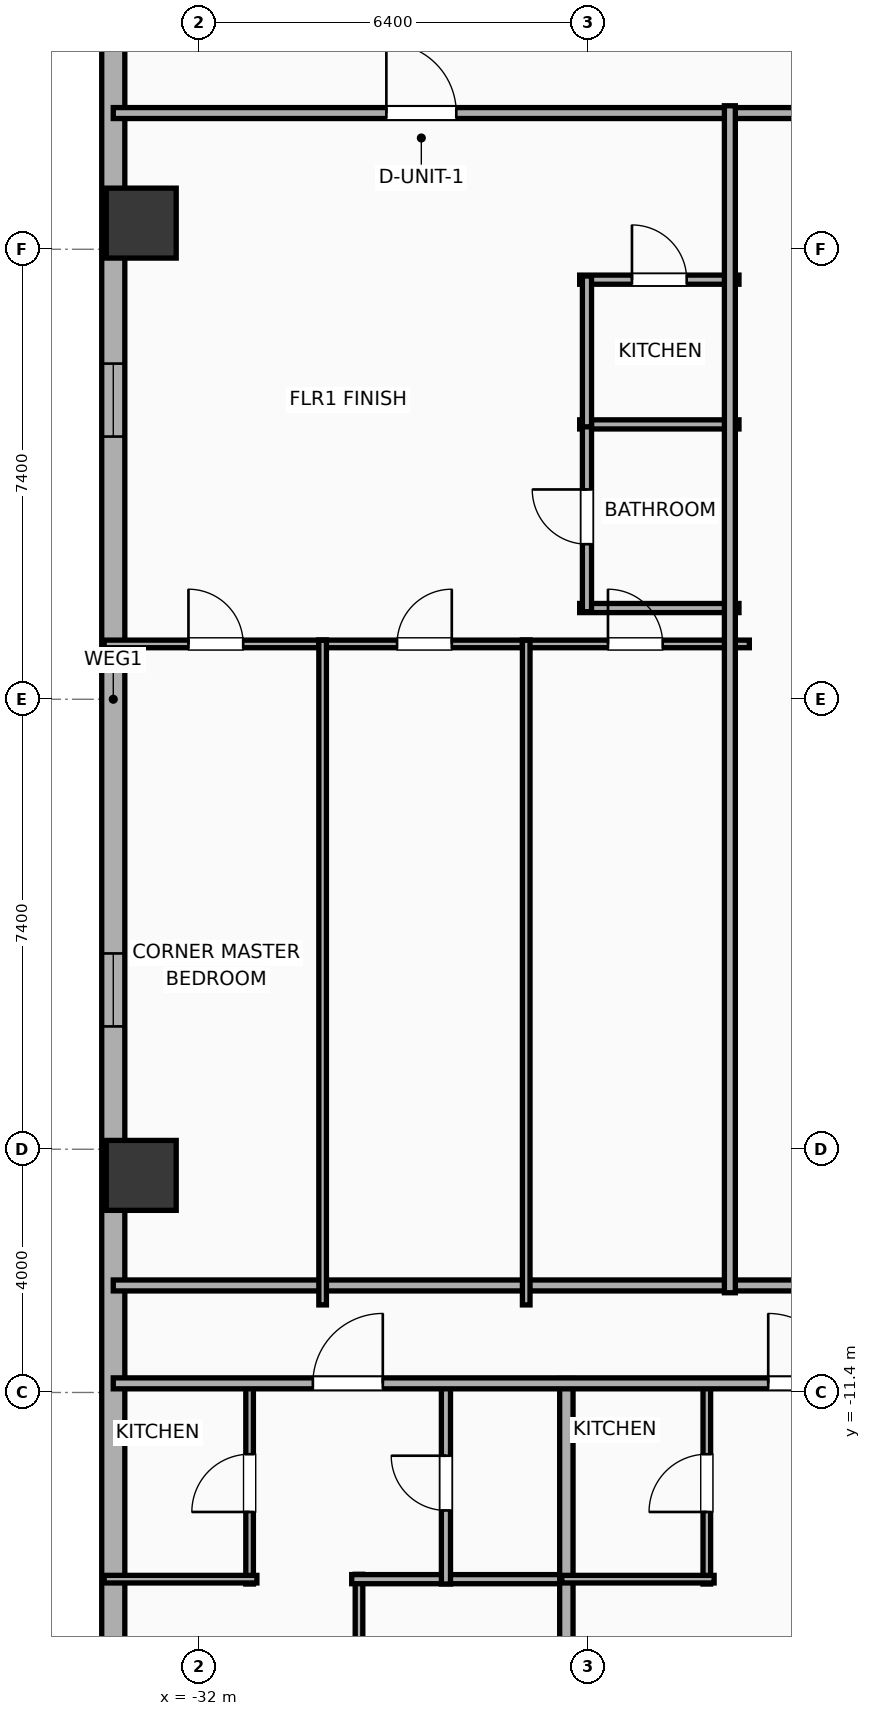
"""IFC4 building model, lengths in metres.
Left out: names, types, materials, properties, quantities, classifications, styles, units other than length and angle.
Written with IfcOpenShell. Run it as: python <this file> out.ifc"""

import sys

from ifc_helpers import new_model, si_unit, direction, frame, frame_2d, origin, origin_2d, place, context, subcontext, project, spatial, rectangle, hollow_rectangle, extrude, element, fill, save


model = new_model("IFC4")
c1 = context("Model", 3, precision=1e-05, world=origin(), true_north=direction((0.0, 1.0)))
c2 = subcontext(c1, "Body", "Model", "MODEL_VIEW")
j1 = project(units=[si_unit("LENGTHUNIT", "METRE"), si_unit("PLANEANGLEUNIT", "RADIAN")], contexts=[c1])
p1 = place(None, origin())
s1 = spatial("IfcSite", under=j1, at=p1, CompositionType="ELEMENT")
p2 = place(p1, origin())
s2 = spatial("IfcBuilding", under=s1, at=p2, CompositionType="ELEMENT")
p3 = place(p2, frame((0.0, 0.0, 76.7)))
s3 = spatial("IfcBuildingStorey", under=s2, at=p3, CompositionType="ELEMENT", Elevation=76.7)
for number, where, z_axis, x_axis in (
    (1, (-32.95, 7.83, 0.0), (0.0, 0.0, 1.0), (1.0, 0.0, 0.0)),
    (2, (-32.95, -7.83, 0.0), (0.0, 0.0, 1.0), (1.0, 0.0, 0.0)),
):
    element("IfcColumn", number, at=place(p3, frame(where, z_axis=z_axis, x_axis=x_axis)), inside=s3, PredefinedType="COLUMN", context=c2, shape_type="SweptSolid", body=[
        extrude(hollow_rectangle(XDim=1.15, YDim=1.15, WallThickness=0.04, at=origin_2d()), origin(), (0.0, 0.0, 1.0), 3.9),
    ])
p4 = place(p3, frame((-33.41, -18.381, 0.0), z_axis=(0.0, 0.0, 1.0), x_axis=(0.0, 1.0, 0.0)))
e3 = element("IfcWall", 3, at=p4, inside=s3, PredefinedType="ELEMENTEDWALL", context=c2, shape_type="SweptSolid", body=[
    extrude(rectangle(XDim=36.763, YDim=0.38, at=frame_2d((18.381, 0.0))), origin(), (0.0, 0.0, 1.0), 3.6),
])
p5 = place(p4, frame((33.762, 0.0, 0.75)))
e4 = element("IfcOpeningElement", 4, at=p5, cuts=e3, PredefinedType="OPENING", context=c2, shape_type="SweptSolid", body=[
    extrude(rectangle(XDim=1.2, YDim=2.05, at=frame_2d((0.6, 1.025))), frame((0.0, 0.2, 0.0), z_axis=(0.0, -1.0, 0.0), x_axis=(1.0, 0.0, 0.0)), (0.0, 0.0, 1.0), 0.4),
])
p6 = place(p4, frame((22.701, 0.0, 0.75)))
e5 = element("IfcOpeningElement", 5, at=p6, cuts=e3, PredefinedType="OPENING", context=c2, shape_type="SweptSolid", body=[
    extrude(rectangle(XDim=1.2, YDim=2.05, at=frame_2d((0.6, 1.025))), frame((0.0, 0.2, 0.0), z_axis=(0.0, -1.0, 0.0), x_axis=(1.0, 0.0, 0.0)), (0.0, 0.0, 1.0), 0.4),
])
p7 = place(p4, frame((13.001, 0.0, 0.75)))
e6 = element("IfcOpeningElement", 6, at=p7, cuts=e3, PredefinedType="OPENING", context=c2, shape_type="SweptSolid", body=[
    extrude(rectangle(XDim=1.2, YDim=2.05, at=frame_2d((0.6, 1.025))), frame((0.0, 0.2, 0.0), z_axis=(0.0, -1.0, 0.0), x_axis=(1.0, 0.0, 0.0)), (0.0, 0.0, 1.0), 0.4),
])
p8 = place(p3, frame((-33.41, 9.64, 0.0), z_axis=(0.0, 0.0, 1.0), x_axis=(1.0, 0.0, 0.0)))
e7 = element("IfcWall", 7, at=p8, inside=s3, PredefinedType="PARTITIONING", context=c2, shape_type="SweptSolid", body=[
    extrude(rectangle(XDim=23.53, YDim=0.18, at=frame_2d((11.765, 0.0))), origin(), (0.0, 0.0, 1.0), 3.6),
])
p9 = place(p8, frame((4.491, 0.0, 0.0)))
e8 = element("IfcOpeningElement", 8, at=p9, cuts=e7, PredefinedType="OPENING", context=c2, shape_type="SweptSolid", body=[
    extrude(rectangle(XDim=1.15, YDim=2.05, at=frame_2d((0.575, 1.025))), frame((0.0, 0.1, 0.0), z_axis=(0.0, -1.0, 0.0), x_axis=(1.0, 0.0, 0.0)), (0.0, 0.0, 1.0), 0.2),
])
p10 = place(p3, frame((-33.41, -9.64, 0.0), z_axis=(0.0, 0.0, 1.0), x_axis=(1.0, 0.0, 0.0)))
e9 = element("IfcWall", 9, at=p10, inside=s3, PredefinedType="PARTITIONING", context=c2, shape_type="SweptSolid", body=[
    extrude(rectangle(XDim=23.53, YDim=0.18, at=frame_2d((11.765, 0.0))), origin(), (0.0, 0.0, 1.0), 3.6),
])
p11 = place(p3, frame((-29.369, -22.36, 0.0), z_axis=(0.0, 0.0, 1.0), x_axis=(0.0, 1.0, 0.0)))
e10 = element("IfcWall", 10, at=p11, inside=s3, PredefinedType="PARTITIONING", context=c2, shape_type="SweptSolid", body=[
    extrude(rectangle(XDim=7.97, YDim=0.125, at=frame_2d((3.985, 0.0))), origin(), (0.0, 0.0, 1.0), 3.6),
])
p12 = place(p11, frame((5.607, 0.0, 0.0)))
e11 = element("IfcOpeningElement", 11, at=p12, cuts=e10, PredefinedType="OPENING", context=c2, shape_type="SweptSolid", body=[
    extrude(rectangle(XDim=0.9, YDim=2.05, at=frame_2d((0.45, 1.025))), frame((0.0, 0.073, 0.0), z_axis=(0.0, -1.0, 0.0), x_axis=(1.0, 0.0, 0.0)), (0.0, 0.0, 1.0), 0.145),
])
p13 = place(p3, frame((-29.489, -14.47, 0.0), z_axis=(0.0, 0.0, 1.0), x_axis=(1.0, 0.0, 0.0)))
e12 = element("IfcWall", 12, at=p13, inside=s3, PredefinedType="PLUMBINGWALL", context=c2, shape_type="SweptSolid", body=[
    extrude(rectangle(XDim=3.605, YDim=0.15, at=frame_2d((1.802, 0.0))), origin(), (0.0, 0.0, 1.0), 3.6),
])
p14 = place(p3, frame((-31.168, -14.55, 0.0), z_axis=(0.0, 0.0, 1.0), x_axis=(0.0, 1.0, 0.0)))
e13 = element("IfcWall", 13, at=p14, inside=s3, PredefinedType="PARTITIONING", context=c2, shape_type="SweptSolid", body=[
    extrude(rectangle(XDim=3.32, YDim=0.125, at=frame_2d((1.66, 0.0))), origin(), (0.0, 0.0, 1.0), 2.89),
])
p15 = place(p14, frame((1.185, 0.0, 0.0)))
e14 = element("IfcOpeningElement", 14, at=p15, cuts=e13, PredefinedType="OPENING", context=c2, shape_type="SweptSolid", body=[
    extrude(rectangle(XDim=0.95, YDim=2.05, at=frame_2d((0.475, 1.025))), frame((0.0, 0.073, 0.0), z_axis=(0.0, -1.0, 0.0), x_axis=(1.0, 0.0, 0.0)), (0.0, 0.0, 1.0), 0.145),
])
p16 = place(p3, frame((-33.56, -14.47, 0.0), z_axis=(0.0, 0.0, 1.0), x_axis=(1.0, 0.0, 0.0)))
e15 = element("IfcWall", 15, at=p16, inside=s3, PredefinedType="PARTITIONING", context=c2, shape_type="SweptSolid", body=[
    extrude(rectangle(XDim=2.512, YDim=0.125, at=frame_2d((1.256, 0.0))), origin(), (0.0, 0.0, 1.0), 3.6),
])
p17 = place(p3, frame((-27.939, -14.55, 0.0), z_axis=(0.0, 0.0, 1.0), x_axis=(0.0, 1.0, 0.0)))
e16 = element("IfcWall", 16, at=p17, inside=s3, PredefinedType="PLUMBINGWALL", context=c2, shape_type="SweptSolid", body=[
    extrude(rectangle(XDim=3.32, YDim=0.15, at=frame_2d((1.66, 0.0))), origin(), (0.0, 0.0, 1.0), 3.6),
])
p18 = place(p17, frame((1.21, 0.0, 0.0)))
e17 = element("IfcOpeningElement", 17, at=p18, cuts=e16, PredefinedType="OPENING", context=c2, shape_type="SweptSolid", body=[
    extrude(rectangle(XDim=0.9, YDim=2.05, at=frame_2d((0.45, 1.025))), frame((0.0, 0.085, 0.0), z_axis=(0.0, -1.0, 0.0), x_axis=(1.0, 0.0, 0.0)), (0.0, 0.0, 1.0), 0.17),
])
p19 = place(p3, frame((-25.959, -22.21, 0.0), z_axis=(0.0, 0.0, 1.0), x_axis=(0.0, 1.0, 0.0)))
e18 = element("IfcWall", 18, at=p19, inside=s3, PredefinedType="PARTITIONING", context=c2, shape_type="SweptSolid", body=[
    extrude(rectangle(XDim=11.04, YDim=0.22, at=frame_2d((5.52, 0.0))), origin(), (0.0, 0.0, 1.0), 3.6),
])
p20 = place(p3, frame((-23.649, -14.55, 0.0), z_axis=(0.0, 0.0, 1.0), x_axis=(0.0, 1.0, 0.0)))
e19 = element("IfcWall", 19, at=p20, inside=s3, PredefinedType="PARTITIONING", context=c2, shape_type="SweptSolid", body=[
    extrude(rectangle(XDim=3.32, YDim=0.125, at=frame_2d((1.66, 0.0))), origin(), (0.0, 0.0, 1.0), 3.6),
])
p21 = place(p20, frame((1.185, 0.0, 0.0)))
e20 = element("IfcOpeningElement", 20, at=p21, cuts=e19, PredefinedType="OPENING", context=c2, shape_type="SweptSolid", body=[
    extrude(rectangle(XDim=0.95, YDim=2.05, at=frame_2d((0.475, 1.025))), frame((0.0, 0.073, 0.0), z_axis=(0.0, -1.0, 0.0), x_axis=(1.0, 0.0, 0.0)), (0.0, 0.0, 1.0), 0.145),
])
p22 = place(p3, frame((-26.034, -14.47, 0.0), z_axis=(0.0, 0.0, 1.0), x_axis=(1.0, 0.0, 0.0)))
e21 = element("IfcWall", 21, at=p22, inside=s3, PredefinedType="PARTITIONING", context=c2, shape_type="SweptSolid", body=[
    extrude(rectangle(XDim=2.505, YDim=0.125, at=frame_2d((1.252, 0.0))), origin(), (0.0, 0.0, 1.0), 3.6),
])
p23 = place(p3, frame((-33.41, -11.25, 0.0), z_axis=(0.0, 0.0, 1.0), x_axis=(1.0, 0.0, 0.0)))
e22 = element("IfcWall", 22, at=p23, inside=s3, PredefinedType="PARTITIONING", context=c2, shape_type="SweptSolid", body=[
    extrude(rectangle(XDim=59.62, YDim=0.18, at=frame_2d((29.81, 0.0))), origin(), (0.0, 0.0, 1.0), 3.6),
])
p24 = place(p23, frame((3.282, 0.0, 0.0)))
e23 = element("IfcOpeningElement", 23, at=p24, cuts=e22, PredefinedType="OPENING", context=c2, shape_type="SweptSolid", body=[
    extrude(rectangle(XDim=1.15, YDim=2.05, at=frame_2d((0.575, 1.025))), frame((0.0, 0.1, 0.0), z_axis=(0.0, -1.0, 0.0), x_axis=(1.0, 0.0, 0.0)), (0.0, 0.0, 1.0), 0.2),
])
p25 = place(p23, frame((10.771, 0.0, 0.0)))
e24 = element("IfcOpeningElement", 24, at=p25, cuts=e22, PredefinedType="OPENING", context=c2, shape_type="SweptSolid", body=[
    extrude(rectangle(XDim=1.15, YDim=2.05, at=frame_2d((0.575, 1.025))), frame((0.0, 0.1, 0.0), z_axis=(0.0, -1.0, 0.0), x_axis=(1.0, 0.0, 0.0)), (0.0, 0.0, 1.0), 0.2),
])
p26 = place(p23, frame((18.778, 0.0, 0.0)))
e25 = element("IfcOpeningElement", 25, at=p26, cuts=e22, PredefinedType="OPENING", context=c2, shape_type="SweptSolid", body=[
    extrude(rectangle(XDim=1.15, YDim=2.05, at=frame_2d((0.575, 1.025))), frame((0.0, 0.1, 0.0), z_axis=(0.0, -1.0, 0.0), x_axis=(1.0, 0.0, 0.0)), (0.0, 0.0, 1.0), 0.2),
])
p27 = place(p23, frame((24.34, 0.0, 0.0)))
e26 = element("IfcOpeningElement", 26, at=p27, cuts=e22, PredefinedType="OPENING", context=c2, shape_type="SweptSolid", body=[
    extrude(rectangle(XDim=0.9, YDim=2.05, at=frame_2d((0.45, 1.025))), frame((0.0, 0.1, 0.0), z_axis=(0.0, -1.0, 0.0), x_axis=(1.0, 0.0, 0.0)), (0.0, 0.0, 1.0), 0.2),
])
p28 = place(p23, frame((31.829, 0.0, 0.0)))
e27 = element("IfcOpeningElement", 27, at=p28, cuts=e22, PredefinedType="OPENING", context=c2, shape_type="SweptSolid", body=[
    extrude(rectangle(XDim=1.15, YDim=2.05, at=frame_2d((0.575, 1.025))), frame((0.0, 0.1, 0.0), z_axis=(0.0, -1.0, 0.0), x_axis=(1.0, 0.0, 0.0)), (0.0, 0.0, 1.0), 0.2),
])
p29 = place(p23, frame((35.948, 0.0, 0.0)))
e28 = element("IfcOpeningElement", 28, at=p29, cuts=e22, PredefinedType="OPENING", context=c2, shape_type="SweptSolid", body=[
    extrude(rectangle(XDim=1.15, YDim=2.05, at=frame_2d((0.575, 1.025))), frame((0.0, 0.1, 0.0), z_axis=(0.0, -1.0, 0.0), x_axis=(1.0, 0.0, 0.0)), (0.0, 0.0, 1.0), 0.2),
])
p30 = place(p23, frame((43.705, 0.0, 0.0)))
e29 = element("IfcOpeningElement", 29, at=p30, cuts=e22, PredefinedType="OPENING", context=c2, shape_type="SweptSolid", body=[
    extrude(rectangle(XDim=0.9, YDim=2.05, at=frame_2d((0.45, 1.025))), frame((0.0, 0.1, 0.0), z_axis=(0.0, -1.0, 0.0), x_axis=(1.0, 0.0, 0.0)), (0.0, 0.0, 1.0), 0.2),
])
p31 = place(p23, frame((48.552, 0.0, 0.0)))
e30 = element("IfcOpeningElement", 30, at=p31, cuts=e22, PredefinedType="OPENING", context=c2, shape_type="SweptSolid", body=[
    extrude(rectangle(XDim=1.15, YDim=2.05, at=frame_2d((0.575, 1.025))), frame((0.0, 0.1, 0.0), z_axis=(0.0, -1.0, 0.0), x_axis=(1.0, 0.0, 0.0)), (0.0, 0.0, 1.0), 0.2),
])
p32 = place(p23, frame((56.213, 0.0, 0.0)))
e31 = element("IfcOpeningElement", 31, at=p32, cuts=e22, PredefinedType="OPENING", context=c2, shape_type="SweptSolid", body=[
    extrude(rectangle(XDim=0.9, YDim=2.05, at=frame_2d((0.45, 1.025))), frame((0.0, 0.1, 0.0), z_axis=(0.0, -1.0, 0.0), x_axis=(1.0, 0.0, 0.0)), (0.0, 0.0, 1.0), 0.2),
])
p33 = place(p3, frame((-25.74, 6.9, 0.0), z_axis=(0.0, 0.0, 1.0), x_axis=(1.0, 0.0, 0.0)))
e32 = element("IfcWall", 32, at=p33, inside=s3, PredefinedType="PLUMBINGWALL", context=c2, shape_type="SweptSolid", body=[
    extrude(rectangle(XDim=2.62, YDim=0.15, at=frame_2d((1.31, 0.0))), origin(), (0.0, 0.0, 1.0), 3.6),
])
p34 = place(p33, frame((0.86, 0.0, 0.0)))
e33 = element("IfcOpeningElement", 33, at=p34, cuts=e32, PredefinedType="OPENING", context=c2, shape_type="SweptSolid", body=[
    extrude(rectangle(XDim=0.9, YDim=2.05, at=frame_2d((0.45, 1.025))), frame((0.0, 0.085, 0.0), z_axis=(0.0, -1.0, 0.0), x_axis=(1.0, 0.0, 0.0)), (0.0, 0.0, 1.0), 0.17),
])
for number, where, z_axis, x_axis in (
    (34, (-25.74, 4.52, 0.0), (0.0, 0.0, 1.0), (1.0, 0.0, 0.0)),
    (35, (-25.74, 1.5, 0.0), (0.0, 0.0, 1.0), (1.0, 0.0, 0.0)),
):
    element("IfcWall", number, at=place(p3, frame(where, z_axis=z_axis, x_axis=x_axis)), inside=s3, PredefinedType="PLUMBINGWALL", context=c2, shape_type="SweptSolid", body=[
        extrude(rectangle(XDim=2.62, YDim=0.15, at=frame_2d((1.31, 0.0))), origin(), (0.0, 0.0, 1.0), 3.6),
    ])
p35 = place(p3, frame((-25.62, 1.44, 0.0), z_axis=(0.0, 0.0, 1.0), x_axis=(0.0, 1.0, 0.0)))
e36 = element("IfcWall", 36, at=p35, inside=s3, PredefinedType="PLUMBINGWALL", context=c2, shape_type="SweptSolid", body=[
    extrude(rectangle(XDim=3.12, YDim=0.15, at=frame_2d((1.56, 0.0))), origin(), (0.0, 0.0, 1.0), 3.6),
])
p36 = place(p35, frame((1.11, 0.0, 0.0)))
e37 = element("IfcOpeningElement", 37, at=p36, cuts=e36, PredefinedType="OPENING", context=c2, shape_type="SweptSolid", body=[
    extrude(rectangle(XDim=0.9, YDim=2.05, at=frame_2d((0.45, 1.025))), frame((0.0, 0.085, 0.0), z_axis=(0.0, -1.0, 0.0), x_axis=(1.0, 0.0, 0.0)), (0.0, 0.0, 1.0), 0.17),
])
p37 = place(p3, frame((-25.62, 4.48, 0.0), z_axis=(0.0, 0.0, 1.0), x_axis=(0.0, 1.0, 0.0)))
e38 = element("IfcWall", 38, at=p37, inside=s3, PredefinedType="PLUMBINGWALL", context=c2, shape_type="SweptSolid", body=[
    extrude(rectangle(XDim=2.48, YDim=0.15, at=frame_2d((1.24, 0.0))), origin(), (0.0, 0.0, 1.0), 3.6),
])
p38 = place(p3, frame((-33.56, 0.91, 0.0), z_axis=(0.0, 0.0, 1.0), x_axis=(1.0, 0.0, 0.0)))
e39 = element("IfcWall", 39, at=p38, inside=s3, PredefinedType="PARTITIONING", context=c2, shape_type="SweptSolid", body=[
    extrude(rectangle(XDim=3.656, YDim=0.125, at=frame_2d((1.828, 0.0))), origin(), (0.0, 0.0, 1.0), 3.6),
])
p39 = place(p38, frame((1.386, 0.0, 0.0)))
e40 = element("IfcOpeningElement", 40, at=p39, cuts=e39, PredefinedType="OPENING", context=c2, shape_type="SweptSolid", body=[
    extrude(rectangle(XDim=0.9, YDim=2.05, at=frame_2d((0.45, 1.025))), frame((0.0, 0.073, 0.0), z_axis=(0.0, -1.0, 0.0), x_axis=(1.0, 0.0, 0.0)), (0.0, 0.0, 1.0), 0.145),
])
p40 = place(p3, frame((-30.03, 0.91, 0.0), z_axis=(0.0, 0.0, 1.0), x_axis=(1.0, 0.0, 0.0)))
e41 = element("IfcWall", 41, at=p40, inside=s3, PredefinedType="PARTITIONING", context=c2, shape_type="SweptSolid", body=[
    extrude(rectangle(XDim=3.473, YDim=0.125, at=frame_2d((1.737, 0.0))), origin(), (0.0, 0.0, 1.0), 3.6),
])
p41 = place(p40, frame((1.287, 0.0, 0.0)))
e42 = element("IfcOpeningElement", 42, at=p41, cuts=e41, PredefinedType="OPENING", context=c2, shape_type="SweptSolid", body=[
    extrude(rectangle(XDim=0.9, YDim=2.05, at=frame_2d((0.45, 1.025))), frame((0.0, 0.073, 0.0), z_axis=(0.0, -1.0, 0.0), x_axis=(1.0, 0.0, 0.0)), (0.0, 0.0, 1.0), 0.145),
])
p42 = place(p3, frame((-26.681, 0.91, 0.0), z_axis=(0.0, 0.0, 1.0), x_axis=(1.0, 0.0, 0.0)))
e43 = element("IfcWall", 43, at=p42, inside=s3, PredefinedType="PARTITIONING", context=c2, shape_type="SweptSolid", body=[
    extrude(rectangle(XDim=3.731, YDim=0.125, at=frame_2d((1.866, 0.0))), origin(), (0.0, 0.0, 1.0), 3.6),
])
p43 = place(p42, frame((1.407, 0.0, 0.0)))
e44 = element("IfcOpeningElement", 44, at=p43, cuts=e43, PredefinedType="OPENING", context=c2, shape_type="SweptSolid", body=[
    extrude(rectangle(XDim=0.9, YDim=2.05, at=frame_2d((0.45, 1.025))), frame((0.0, 0.073, 0.0), z_axis=(0.0, -1.0, 0.0), x_axis=(1.0, 0.0, 0.0)), (0.0, 0.0, 1.0), 0.145),
])
for number, where, z_axis, x_axis in (
    (45, (-26.619, -9.96, 0.0), (0.0, 0.0, 1.0), (0.0, 1.0, 0.0)),
    (46, (-29.967, -9.96, 0.0), (0.0, 0.0, 1.0), (0.0, 1.0, 0.0)),
):
    element("IfcWall", number, at=place(p3, frame(where, z_axis=z_axis, x_axis=x_axis)), inside=s3, PredefinedType="PARTITIONING", context=c2, shape_type="SweptSolid", body=[
        extrude(rectangle(XDim=10.93, YDim=0.125, at=frame_2d((5.465, 0.0))), origin(), (0.0, 0.0, 1.0), 3.6),
    ])
p44 = place(p3, frame((-23.27, -9.76, 0.0), z_axis=(0.0, 0.0, 1.0), x_axis=(0.0, 1.0, 0.0)))
e47 = element("IfcWall", 47, at=p44, inside=s3, PredefinedType="PARTITIONING", context=c2, shape_type="SweptSolid", body=[
    extrude(rectangle(XDim=19.52, YDim=0.18, at=frame_2d((9.76, 0.0))), origin(), (0.0, 0.0, 1.0), 3.6),
])
p45 = place(p6, origin())
e48 = element("IfcWindow", 48, at=p45, inside=s3, PartitioningType="SINGLE_PANEL", PredefinedType="WINDOW", context=c2, shape_type="SweptSolid", body=[
    extrude(rectangle(XDim=1.2, YDim=2.05, at=frame_2d((0.6, 1.025))), frame((0.0, 0.03, 0.0), z_axis=(0.0, -1.0, 0.0), x_axis=(1.0, 0.0, 0.0)), (0.0, 0.0, 1.0), 0.06),
])
fill(e5, e48)
p46 = place(p7, origin())
e49 = element("IfcWindow", 49, at=p46, inside=s3, PartitioningType="SINGLE_PANEL", PredefinedType="WINDOW", context=c2, shape_type="SweptSolid", body=[
    extrude(rectangle(XDim=1.2, YDim=2.05, at=frame_2d((0.6, 1.025))), frame((0.0, 0.03, 0.0), z_axis=(0.0, -1.0, 0.0), x_axis=(1.0, 0.0, 0.0)), (0.0, 0.0, 1.0), 0.06),
])
fill(e6, e49)
p47 = place(p9, origin())
e50 = element("IfcDoor", 50, at=p47, inside=s3, OperationType="SINGLE_SWING_LEFT", PredefinedType="DOOR", context=c2, shape_type="SweptSolid", body=[
    extrude(rectangle(XDim=1.15, YDim=2.05, at=frame_2d((0.575, 1.025))), frame((0.0, 0.025, 0.0), z_axis=(0.0, -1.0, 0.0), x_axis=(1.0, 0.0, 0.0)), (0.0, 0.0, 1.0), 0.05),
])
fill(e8, e50)
p48 = place(p15, origin())
e51 = element("IfcDoor", 51, at=p48, inside=s3, OperationType="SINGLE_SWING_LEFT", PredefinedType="DOOR", context=c2, shape_type="SweptSolid", body=[
    extrude(rectangle(XDim=0.95, YDim=2.05, at=frame_2d((0.475, 1.025))), frame((0.0, 0.025, 0.0), z_axis=(0.0, -1.0, 0.0), x_axis=(1.0, 0.0, 0.0)), (0.0, 0.0, 1.0), 0.05),
])
fill(e14, e51)
p49 = place(p18, origin())
e52 = element("IfcDoor", 52, at=p49, inside=s3, OperationType="SINGLE_SWING_RIGHT", PredefinedType="DOOR", context=c2, shape_type="SweptSolid", body=[
    extrude(rectangle(XDim=0.9, YDim=2.05, at=frame_2d((0.45, 1.025))), frame((0.0, 0.025, 0.0), z_axis=(0.0, -1.0, 0.0), x_axis=(1.0, 0.0, 0.0)), (0.0, 0.0, 1.0), 0.05),
])
fill(e17, e52)
p50 = place(p21, origin())
e53 = element("IfcDoor", 53, at=p50, inside=s3, OperationType="SINGLE_SWING_LEFT", PredefinedType="DOOR", context=c2, shape_type="SweptSolid", body=[
    extrude(rectangle(XDim=0.95, YDim=2.05, at=frame_2d((0.475, 1.025))), frame((0.0, 0.025, 0.0), z_axis=(0.0, -1.0, 0.0), x_axis=(1.0, 0.0, 0.0)), (0.0, 0.0, 1.0), 0.05),
])
fill(e20, e53)
p51 = place(p24, origin())
e54 = element("IfcDoor", 54, at=p51, inside=s3, OperationType="SINGLE_SWING_RIGHT", PredefinedType="DOOR", context=c2, shape_type="SweptSolid", body=[
    extrude(rectangle(XDim=1.15, YDim=2.05, at=frame_2d((0.575, 1.025))), frame((0.0, 0.025, 0.0), z_axis=(0.0, -1.0, 0.0), x_axis=(1.0, 0.0, 0.0)), (0.0, 0.0, 1.0), 0.05),
])
fill(e23, e54)
p52 = place(p25, origin())
e55 = element("IfcDoor", 55, at=p52, inside=s3, OperationType="SINGLE_SWING_LEFT", PredefinedType="DOOR", context=c2, shape_type="SweptSolid", body=[
    extrude(rectangle(XDim=1.15, YDim=2.05, at=frame_2d((0.575, 1.025))), frame((0.0, 0.025, 0.0), z_axis=(0.0, -1.0, 0.0), x_axis=(1.0, 0.0, 0.0)), (0.0, 0.0, 1.0), 0.05),
])
fill(e24, e55)
p53 = place(p34, origin())
e56 = element("IfcDoor", 56, at=p53, inside=s3, OperationType="SINGLE_SWING_LEFT", PredefinedType="DOOR", context=c2, shape_type="SweptSolid", body=[
    extrude(rectangle(XDim=0.9, YDim=2.05, at=frame_2d((0.45, 1.025))), frame((0.0, 0.025, 0.0), z_axis=(0.0, -1.0, 0.0), x_axis=(1.0, 0.0, 0.0)), (0.0, 0.0, 1.0), 0.05),
])
fill(e33, e56)
p54 = place(p36, origin())
e57 = element("IfcDoor", 57, at=p54, inside=s3, OperationType="SINGLE_SWING_RIGHT", PredefinedType="DOOR", context=c2, shape_type="SweptSolid", body=[
    extrude(rectangle(XDim=0.9, YDim=2.05, at=frame_2d((0.45, 1.025))), frame((0.0, 0.025, 0.0), z_axis=(0.0, -1.0, 0.0), x_axis=(1.0, 0.0, 0.0)), (0.0, 0.0, 1.0), 0.05),
])
fill(e37, e57)
p55 = place(p39, origin())
e58 = element("IfcDoor", 58, at=p55, inside=s3, OperationType="SINGLE_SWING_LEFT", PredefinedType="DOOR", context=c2, shape_type="SweptSolid", body=[
    extrude(rectangle(XDim=0.9, YDim=2.05, at=frame_2d((0.45, 1.025))), frame((0.0, 0.025, 0.0), z_axis=(0.0, -1.0, 0.0), x_axis=(1.0, 0.0, 0.0)), (0.0, 0.0, 1.0), 0.05),
])
fill(e40, e58)
p56 = place(p41, origin())
e59 = element("IfcDoor", 59, at=p56, inside=s3, OperationType="SINGLE_SWING_RIGHT", PredefinedType="DOOR", context=c2, shape_type="SweptSolid", body=[
    extrude(rectangle(XDim=0.9, YDim=2.05, at=frame_2d((0.45, 1.025))), frame((0.0, 0.025, 0.0), z_axis=(0.0, -1.0, 0.0), x_axis=(1.0, 0.0, 0.0)), (0.0, 0.0, 1.0), 0.05),
])
fill(e42, e59)
p57 = place(p43, origin())
e60 = element("IfcDoor", 60, at=p57, inside=s3, OperationType="SINGLE_SWING_LEFT", PredefinedType="DOOR", context=c2, shape_type="SweptSolid", body=[
    extrude(rectangle(XDim=0.9, YDim=2.05, at=frame_2d((0.45, 1.025))), frame((0.0, 0.025, 0.0), z_axis=(0.0, -1.0, 0.0), x_axis=(1.0, 0.0, 0.0)), (0.0, 0.0, 1.0), 0.05),
])
fill(e44, e60)
save(model, sys.argv[1])
